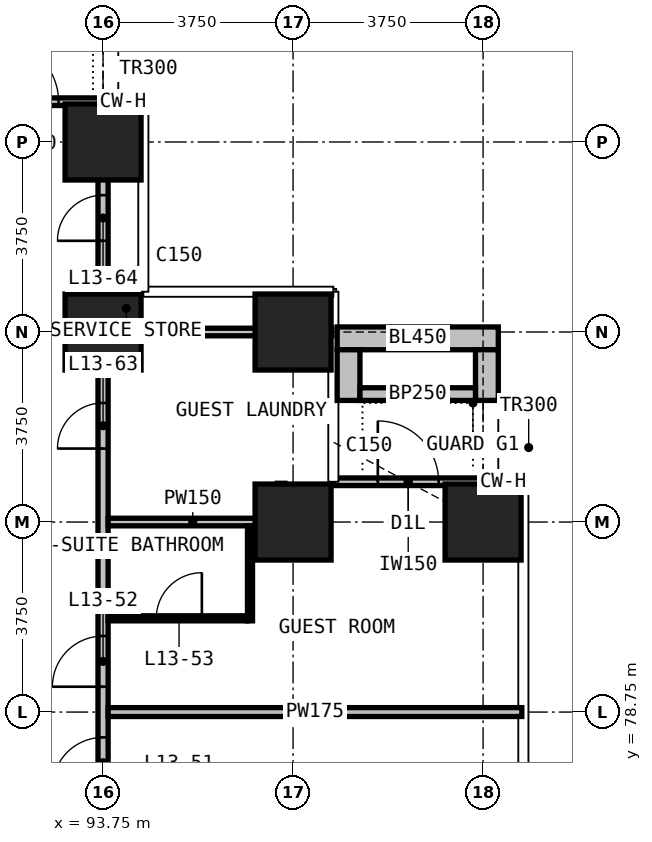
"""IFC4 building model, lengths in metres.
Left out: names, types, materials, properties, quantities, classifications, styles, units other than length and angle.
Written with IfcOpenShell. Run it as: python <this file> out.ifc"""

import sys

from ifc_helpers import new_model, si_unit, direction, frame, frame_2d, origin, origin_2d, place, context, subcontext, project, spatial, rectangle, extrude, element, fill, save


model = new_model("IFC4")
c1 = context("Model", 3, precision=1e-05, world=origin(), true_north=direction((0.0, 1.0)))
c2 = subcontext(c1, "Body", "Model", "MODEL_VIEW")
j1 = project(units=[si_unit("LENGTHUNIT", "METRE"), si_unit("PLANEANGLEUNIT", "RADIAN")], contexts=[c1])
p1 = place(None, origin())
s1 = spatial("IfcSite", under=j1, at=p1, CompositionType="ELEMENT")
p2 = place(p1, origin())
s2 = spatial("IfcBuilding", under=s1, at=p2, CompositionType="ELEMENT")
p3 = place(p2, frame((0.0, 0.0, 62.6)))
s3 = spatial("IfcBuildingStorey", under=s2, at=p3, CompositionType="ELEMENT", Elevation=62.6)
for number, where, z_axis, x_axis in (
    (1, (93.75, 86.25, 0.0), (0.0, 0.0, 1.0), (1.0, 0.0, 0.0)),
    (2, (93.75, 90.0, 0.0), (0.0, 0.0, 1.0), (1.0, 0.0, 0.0)),
    (3, (97.5, 82.5, 0.0), (0.0, 0.0, 1.0), (1.0, 0.0, 0.0)),
    (4, (97.5, 86.25, 0.0), (0.0, 0.0, 1.0), (1.0, 0.0, 0.0)),
    (5, (101.25, 82.5, 0.0), (0.0, 0.0, 1.0), (1.0, 0.0, 0.0)),
):
    element("IfcColumn", number, at=place(p3, frame(where, z_axis=z_axis, x_axis=x_axis)), inside=s3, PredefinedType="COLUMN", context=c2, shape_type="SweptSolid", body=[
        extrude(rectangle(XDim=1.5, YDim=1.5, at=origin_2d()), origin(), (0.0, 0.0, 1.0), 3.3),
    ])
p4 = place(p3, frame((98.295, 83.295, 0.0), z_axis=(0.0, 0.0, 1.0), x_axis=(1.0, 0.0, 0.0)))
e6 = element("IfcWall", 6, at=p4, inside=s3, PredefinedType="SOLIDWALL", context=c2, shape_type="SweptSolid", body=[
    extrude(rectangle(XDim=2.955, YDim=0.15, at=frame_2d((1.478, 0.0))), origin(), (0.0, 0.0, 1.0), 3.0),
])
p5 = place(p4, frame((0.877, 0.0, 0.0)))
e7 = element("IfcOpeningElement", 7, at=p5, cuts=e6, PredefinedType="OPENING", context=c2, shape_type="SweptSolid", body=[
    extrude(rectangle(XDim=1.2, YDim=2.0, at=frame_2d((0.6, 1.0))), frame((0.0, 0.085, 0.0), z_axis=(0.0, -1.0, 0.0), x_axis=(1.0, 0.0, 0.0)), (0.0, 0.0, 1.0), 0.17),
])
p6 = place(p3, frame((90.795, 90.795, 0.0), z_axis=(0.0, 0.0, 1.0), x_axis=(1.0, 0.0, 0.0)))
e8 = element("IfcWall", 8, at=p6, inside=s3, PredefinedType="SOLIDWALL", context=c2, shape_type="SweptSolid", body=[
    extrude(rectangle(XDim=2.955, YDim=0.15, at=frame_2d((1.478, 0.0))), origin(), (0.0, 0.0, 1.0), 3.0),
])
p7 = place(p6, frame((0.877, 0.0, 0.0)))
e9 = element("IfcOpeningElement", 9, at=p7, cuts=e8, PredefinedType="OPENING", context=c2, shape_type="SweptSolid", body=[
    extrude(rectangle(XDim=1.2, YDim=2.4, at=frame_2d((0.6, 1.2))), frame((0.0, 0.085, 0.0), z_axis=(0.0, -1.0, 0.0), x_axis=(1.0, 0.0, 0.0)), (0.0, 0.0, 1.0), 0.17),
])
p8 = place(p3, frame((98.37, 86.125, 0.0), z_axis=(0.0, 0.0, 1.0), x_axis=(1.0, 0.0, 0.0)))
e10 = element("IfcWall", 10, at=p8, inside=s3, PredefinedType="USERDEFINED", context=c2, shape_type="SweptSolid", body=[
    extrude(rectangle(XDim=3.18, YDim=0.45, at=frame_2d((1.59, 0.0))), origin(), (0.0, 0.0, 1.0), 1.1),
])
for number, where, z_axis, x_axis in (
    (11, (98.595, 84.9, 0.0), (0.0, 0.0, 1.0), (0.0, 1.0, 0.0)),
    (12, (101.325, 84.9, 0.0), (0.0, 0.0, 1.0), (0.0, 1.0, 0.0)),
):
    element("IfcWall", number, at=place(p3, frame(where, z_axis=z_axis, x_axis=x_axis)), inside=s3, PredefinedType="USERDEFINED", context=c2, shape_type="SweptSolid", body=[
        extrude(rectangle(XDim=1.0, YDim=0.45, at=frame_2d((0.5, 0.0))), origin(), (0.0, 0.0, 1.0), 1.1),
    ])
p9 = place(p3, frame((98.82, 85.025, 0.0), z_axis=(0.0, 0.0, 1.0), x_axis=(1.0, 0.0, 0.0)))
e13 = element("IfcWall", 13, at=p9, inside=s3, PredefinedType="USERDEFINED", context=c2, shape_type="SweptSolid", body=[
    extrude(rectangle(XDim=2.28, YDim=0.25, at=frame_2d((1.14, 0.0))), origin(), (0.0, 0.0, 1.0), 1.0),
])
p10 = place(p3, frame((93.75, 52.4, 0.0), z_axis=(0.0, 0.0, 1.0), x_axis=(0.0, 1.0, 0.0)))
e14 = element("IfcWall", 14, at=p10, inside=s3, PredefinedType="PARTITIONING", context=c2, shape_type="SweptSolid", body=[
    extrude(rectangle(XDim=38.31, YDim=0.2, at=frame_2d((19.155, 0.0))), origin(), (0.0, 0.0, 1.0), 3.0),
])
p11 = place(p10, frame((5.5, 0.0, 0.0)))
e15 = element("IfcOpeningElement", 15, at=p11, cuts=e14, PredefinedType="OPENING", context=c2, shape_type="SweptSolid", body=[
    extrude(rectangle(XDim=1.0, YDim=2.2, at=frame_2d((0.5, 1.1))), frame((0.0, 0.11, 0.0), z_axis=(0.0, -1.0, 0.0), x_axis=(1.0, 0.0, 0.0)), (0.0, 0.0, 1.0), 0.22),
])
p12 = place(p10, frame((8.1, 0.0, 0.0)))
e16 = element("IfcOpeningElement", 16, at=p12, cuts=e14, PredefinedType="OPENING", context=c2, shape_type="SweptSolid", body=[
    extrude(rectangle(XDim=1.0, YDim=2.2, at=frame_2d((0.5, 1.1))), frame((0.0, 0.11, 0.0), z_axis=(0.0, -1.0, 0.0), x_axis=(1.0, 0.0, 0.0)), (0.0, 0.0, 1.0), 0.22),
])
p13 = place(p10, frame((13.6, 0.0, 0.0)))
e17 = element("IfcOpeningElement", 17, at=p13, cuts=e14, PredefinedType="OPENING", context=c2, shape_type="SweptSolid", body=[
    extrude(rectangle(XDim=1.0, YDim=2.2, at=frame_2d((0.5, 1.1))), frame((0.0, 0.11, 0.0), z_axis=(0.0, -1.0, 0.0), x_axis=(1.0, 0.0, 0.0)), (0.0, 0.0, 1.0), 0.22),
])
p14 = place(p10, frame((16.2, 0.0, 0.0)))
e18 = element("IfcOpeningElement", 18, at=p14, cuts=e14, PredefinedType="OPENING", context=c2, shape_type="SweptSolid", body=[
    extrude(rectangle(XDim=1.0, YDim=2.2, at=frame_2d((0.5, 1.1))), frame((0.0, 0.11, 0.0), z_axis=(0.0, -1.0, 0.0), x_axis=(1.0, 0.0, 0.0)), (0.0, 0.0, 1.0), 0.22),
])
p15 = place(p10, frame((24.85, 0.0, 0.0)))
e19 = element("IfcOpeningElement", 19, at=p15, cuts=e14, PredefinedType="OPENING", context=c2, shape_type="SweptSolid", body=[
    extrude(rectangle(XDim=1.0, YDim=2.2, at=frame_2d((0.5, 1.1))), frame((0.0, 0.11, 0.0), z_axis=(0.0, -1.0, 0.0), x_axis=(1.0, 0.0, 0.0)), (0.0, 0.0, 1.0), 0.22),
])
p16 = place(p10, frame((26.85, 0.0, 0.0)))
e20 = element("IfcOpeningElement", 20, at=p16, cuts=e14, PredefinedType="OPENING", context=c2, shape_type="SweptSolid", body=[
    extrude(rectangle(XDim=1.0, YDim=2.2, at=frame_2d((0.5, 1.1))), frame((0.0, 0.11, 0.0), z_axis=(0.0, -1.0, 0.0), x_axis=(1.0, 0.0, 0.0)), (0.0, 0.0, 1.0), 0.22),
])
p17 = place(p10, frame((31.55, 0.0, 0.0)))
e21 = element("IfcOpeningElement", 21, at=p17, cuts=e14, PredefinedType="OPENING", context=c2, shape_type="SweptSolid", body=[
    extrude(rectangle(XDim=0.9, YDim=2.2, at=frame_2d((0.45, 1.1))), frame((0.0, 0.11, 0.0), z_axis=(0.0, -1.0, 0.0), x_axis=(1.0, 0.0, 0.0)), (0.0, 0.0, 1.0), 0.22),
])
p18 = place(p10, frame((35.65, 0.0, 0.0)))
e22 = element("IfcOpeningElement", 22, at=p18, cuts=e14, PredefinedType="OPENING", context=c2, shape_type="SweptSolid", body=[
    extrude(rectangle(XDim=0.9, YDim=2.2, at=frame_2d((0.45, 1.1))), frame((0.0, 0.11, 0.0), z_axis=(0.0, -1.0, 0.0), x_axis=(1.0, 0.0, 0.0)), (0.0, 0.0, 1.0), 0.22),
])
p19 = place(p3, frame((93.85, 78.75, 0.0), z_axis=(0.0, 0.0, 1.0), x_axis=(1.0, 0.0, 0.0)))
e23 = element("IfcWall", 23, at=p19, inside=s3, PredefinedType="PARTITIONING", context=c2, shape_type="SweptSolid", body=[
    extrude(rectangle(XDim=8.165, YDim=0.175, at=frame_2d((4.083, 0.0))), origin(), (0.0, 0.0, 1.0), 3.0),
])
p20 = place(p3, frame((93.85, 82.5, 0.0), z_axis=(0.0, 0.0, 1.0), x_axis=(1.0, 0.0, 0.0)))
e24 = element("IfcWall", 24, at=p20, inside=s3, PredefinedType="PARTITIONING", context=c2, shape_type="SweptSolid", body=[
    extrude(rectangle(XDim=3.34, YDim=0.15, at=frame_2d((1.67, 0.0))), origin(), (0.0, 0.0, 1.0), 3.0),
])
p21 = place(p3, frame((93.85, 86.25, 0.0), z_axis=(0.0, 0.0, 1.0), x_axis=(1.0, 0.0, 0.0)))
e25 = element("IfcWall", 25, at=p21, inside=s3, PredefinedType="PARTITIONING", context=c2, shape_type="SweptSolid", body=[
    extrude(rectangle(XDim=4.415, YDim=0.15, at=frame_2d((2.208, 0.0))), origin(), (0.0, 0.0, 1.0), 3.0),
])
p22 = place(p3, frame((97.265, 82.425, 0.0), z_axis=(0.0, 0.0, 1.0), x_axis=(0.0, 1.0, 0.0)))
e26 = element("IfcWall", 26, at=p22, inside=s3, PredefinedType="PARTITIONING", context=c2, shape_type="SweptSolid", body=[
    extrude(rectangle(XDim=0.84, YDim=0.15, at=frame_2d((0.42, 0.0))), origin(), (0.0, 0.0, 1.0), 3.0),
])
p23 = place(p3, frame((93.85, 80.6, 0.0), z_axis=(0.0, 0.0, 1.0), x_axis=(1.0, 0.0, 0.0)))
e27 = element("IfcWall", 27, at=p23, inside=s3, PredefinedType="PARTITIONING", context=c2, shape_type="SweptSolid", body=[
    extrude(rectangle(XDim=2.75, YDim=0.1, at=frame_2d((1.375, 0.0))), origin(), (0.0, 0.0, 1.0), 3.0),
])
p24 = place(p23, frame((0.95, 0.0, 0.0)))
e28 = element("IfcOpeningElement", 28, at=p24, cuts=e27, PredefinedType="OPENING", context=c2, shape_type="SweptSolid", body=[
    extrude(rectangle(XDim=0.9, YDim=2.2, at=frame_2d((0.45, 1.1))), frame((0.0, 0.06, 0.0), z_axis=(0.0, -1.0, 0.0), x_axis=(1.0, 0.0, 0.0)), (0.0, 0.0, 1.0), 0.12),
])
p25 = place(p3, frame((96.65, 80.55, 0.0), z_axis=(0.0, 0.0, 1.0), x_axis=(0.0, 1.0, 0.0)))
e29 = element("IfcWall", 29, at=p25, inside=s3, PredefinedType="PARTITIONING", context=c2, shape_type="SweptSolid", body=[
    extrude(rectangle(XDim=1.875, YDim=0.1, at=frame_2d((0.938, 0.0))), origin(), (0.0, 0.0, 1.0), 3.0),
])
p26 = place(p5, origin())
e30 = element("IfcDoor", 30, at=p26, inside=s3, OperationType="SINGLE_SWING_LEFT", PredefinedType="DOOR", context=c2, shape_type="SweptSolid", body=[
    extrude(rectangle(XDim=1.2, YDim=2.0, at=frame_2d((0.6, 1.0))), frame((0.0, 0.025, 0.0), z_axis=(0.0, -1.0, 0.0), x_axis=(1.0, 0.0, 0.0)), (0.0, 0.0, 1.0), 0.05),
])
fill(e7, e30)
p27 = place(p7, origin())
e31 = element("IfcDoor", 31, at=p27, inside=s3, OperationType="SINGLE_SWING_LEFT", PredefinedType="DOOR", context=c2, shape_type="SweptSolid", body=[
    extrude(rectangle(XDim=1.2, YDim=2.4, at=frame_2d((0.6, 1.2))), frame((0.0, 0.025, 0.0), z_axis=(0.0, -1.0, 0.0), x_axis=(1.0, 0.0, 0.0)), (0.0, 0.0, 1.0), 0.05),
])
fill(e9, e31)
p28 = place(p15, origin())
e32 = element("IfcDoor", 32, at=p28, inside=s3, OperationType="SINGLE_SWING_LEFT", PredefinedType="DOOR", context=c2, shape_type="SweptSolid", body=[
    extrude(rectangle(XDim=1.0, YDim=2.2, at=frame_2d((0.5, 1.1))), frame((0.0, 0.025, 0.0), z_axis=(0.0, -1.0, 0.0), x_axis=(1.0, 0.0, 0.0)), (0.0, 0.0, 1.0), 0.05),
])
fill(e19, e32)
p29 = place(p16, origin())
e33 = element("IfcDoor", 33, at=p29, inside=s3, OperationType="SINGLE_SWING_RIGHT", PredefinedType="DOOR", context=c2, shape_type="SweptSolid", body=[
    extrude(rectangle(XDim=1.0, YDim=2.2, at=frame_2d((0.5, 1.1))), frame((0.0, 0.025, 0.0), z_axis=(0.0, -1.0, 0.0), x_axis=(1.0, 0.0, 0.0)), (0.0, 0.0, 1.0), 0.05),
])
fill(e20, e33)
p30 = place(p24, origin())
e34 = element("IfcDoor", 34, at=p30, inside=s3, OperationType="SINGLE_SWING_RIGHT", PredefinedType="DOOR", context=c2, shape_type="SweptSolid", body=[
    extrude(rectangle(XDim=0.9, YDim=2.2, at=frame_2d((0.45, 1.1))), frame((0.0, 0.025, 0.0), z_axis=(0.0, -1.0, 0.0), x_axis=(1.0, 0.0, 0.0)), (0.0, 0.0, 1.0), 0.05),
])
fill(e28, e34)
p31 = place(p17, origin())
e35 = element("IfcDoor", 35, at=p31, inside=s3, OperationType="SINGLE_SWING_LEFT", PredefinedType="DOOR", context=c2, shape_type="SweptSolid", body=[
    extrude(rectangle(XDim=0.9, YDim=2.2, at=frame_2d((0.45, 1.1))), frame((0.0, 0.025, 0.0), z_axis=(0.0, -1.0, 0.0), x_axis=(1.0, 0.0, 0.0)), (0.0, 0.0, 1.0), 0.05),
])
fill(e21, e35)
p32 = place(p18, origin())
e36 = element("IfcDoor", 36, at=p32, inside=s3, OperationType="SINGLE_SWING_LEFT", PredefinedType="DOOR", context=c2, shape_type="SweptSolid", body=[
    extrude(rectangle(XDim=0.9, YDim=2.2, at=frame_2d((0.45, 1.1))), frame((0.0, 0.025, 0.0), z_axis=(0.0, -1.0, 0.0), x_axis=(1.0, 0.0, 0.0)), (0.0, 0.0, 1.0), 0.05),
])
fill(e22, e36)
save(model, sys.argv[1])
